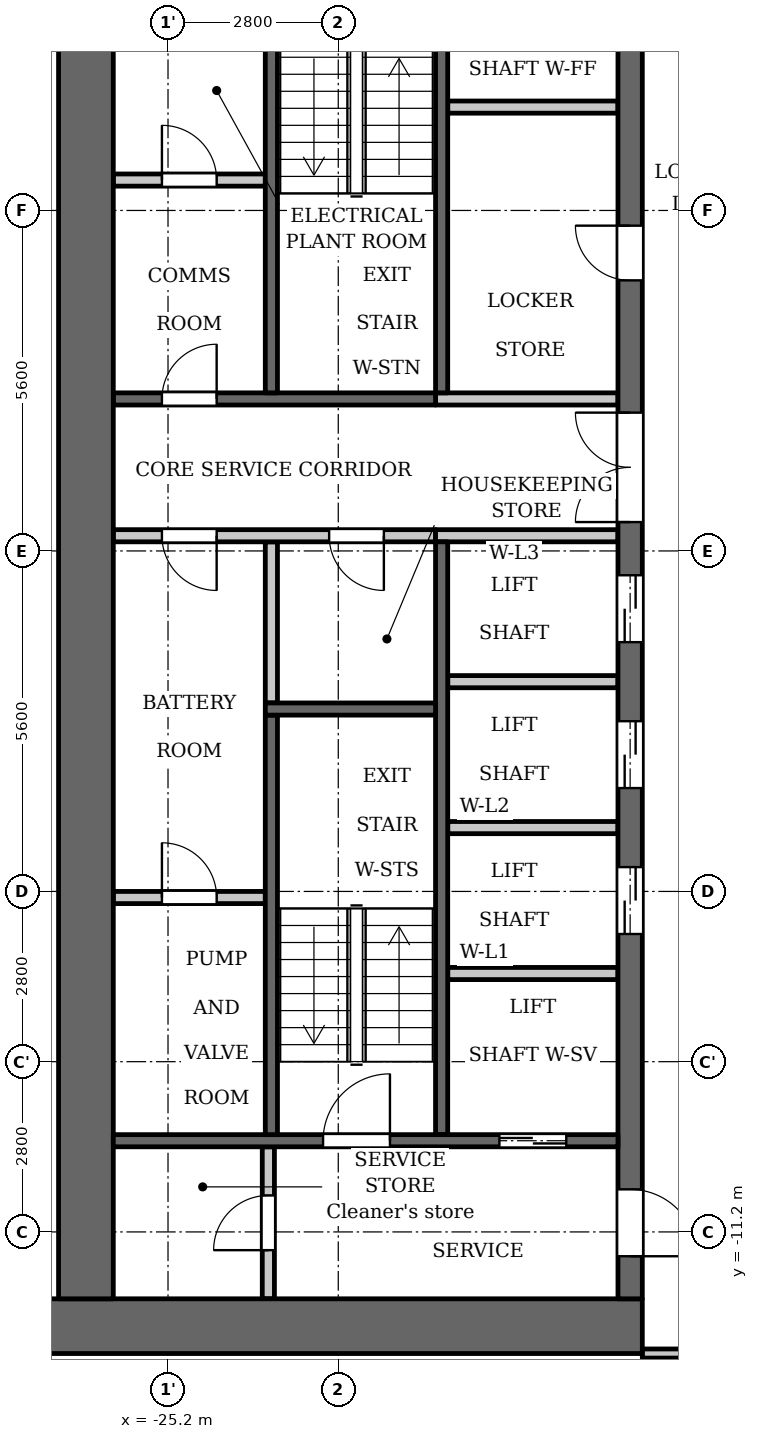
"""IFC4 building model, lengths in metres.
Left out: names, types, materials, properties, quantities, classifications, styles, units other than length and angle.
Written with IfcOpenShell. Run it as: python <this file> out.ifc"""

import sys

from ifc_helpers import new_model, si_unit, direction, frame, frame_2d, origin, place, context, subcontext, project, spatial, rectangle, extrude, element, fill, save


model = new_model("IFC4")
c1 = context("Model", 3, precision=1e-05, world=origin(), true_north=direction((0.0, 1.0)))
c2 = subcontext(c1, "Body", "Model", "MODEL_VIEW")
j1 = project(units=[si_unit("LENGTHUNIT", "METRE"), si_unit("PLANEANGLEUNIT", "RADIAN")], contexts=[c1])
p1 = place(None, origin())
s1 = spatial("IfcSite", under=j1, at=p1, CompositionType="ELEMENT")
p2 = place(p1, origin())
s2 = spatial("IfcBuilding", under=s1, at=p2, CompositionType="ELEMENT")
p3 = place(p2, frame((0.0, 0.0, 100.8)))
s3 = spatial("IfcBuildingStorey", under=s2, at=p3, CompositionType="ELEMENT", Elevation=100.8)
p4 = place(p3, frame((-23.5, -2.5, 0.0), z_axis=(0.0, 0.0, 1.0), x_axis=(0.0, 1.0, 0.0)))
e1 = element("IfcWall", 1, at=p4, inside=s3, PredefinedType="PARTITIONING", context=c2, shape_type="SweptSolid", body=[
    extrude(rectangle(XDim=2.65, YDim=0.2, at=frame_2d((1.325, 0.0))), origin(), (0.0, 0.0, 1.0), 3.2),
])
p5 = place(p3, frame((-20.7, 2.6, 0.0), z_axis=(0.0, 0.0, 1.0), x_axis=(0.0, 1.0, 0.0)))
e2 = element("IfcWall", 2, at=p5, inside=s3, PredefinedType="SHEAR", context=c2, shape_type="SweptSolid", body=[
    extrude(rectangle(XDim=7.0, YDim=0.2, at=frame_2d((3.5, 0.0))), origin(), (0.0, 0.0, 1.0), 3.2),
])
p6 = place(p3, frame((-20.7, -9.6, 0.0), z_axis=(0.0, 0.0, 1.0), x_axis=(0.0, 1.0, 0.0)))
e3 = element("IfcWall", 3, at=p6, inside=s3, PredefinedType="SHEAR", context=c2, shape_type="SweptSolid", body=[
    extrude(rectangle(XDim=9.75, YDim=0.2, at=frame_2d((4.875, 0.0))), origin(), (0.0, 0.0, 1.0), 3.2),
])
p7 = place(p3, frame((-20.8, 2.5, 0.0), z_axis=(0.0, 0.0, 1.0), x_axis=(-1.0, 0.0, 0.0)))
e4 = element("IfcWall", 4, at=p7, inside=s3, PredefinedType="SHEAR", context=c2, shape_type="SweptSolid", body=[
    extrude(rectangle(XDim=5.3, YDim=0.2, at=frame_2d((2.65, 0.0))), origin(), (0.0, 0.0, 1.0), 3.2),
])
p8 = place(p7, frame((3.6, 0.0, 0.0)))
e5 = element("IfcOpeningElement", 5, at=p8, cuts=e4, PredefinedType="OPENING", context=c2, shape_type="SweptSolid", body=[
    extrude(rectangle(XDim=0.9, YDim=2.1, at=frame_2d((0.45, 1.05))), frame((0.0, 0.11, 0.0), z_axis=(0.0, -1.0, 0.0), x_axis=(1.0, 0.0, 0.0)), (0.0, 0.0, 1.0), 0.22),
])
p9 = place(p3, frame((-20.8, 0.25, 0.0), z_axis=(0.0, 0.0, 1.0), x_axis=(-1.0, 0.0, 0.0)))
e6 = element("IfcWall", 6, at=p9, inside=s3, PredefinedType="PARTITIONING", context=c2, shape_type="SweptSolid", body=[
    extrude(rectangle(XDim=5.3, YDim=0.2, at=frame_2d((2.65, 0.0))), origin(), (0.0, 0.0, 1.0), 3.2),
])
p10 = place(p9, frame((0.85, 0.0, 0.0)))
e7 = element("IfcOpeningElement", 7, at=p10, cuts=e6, PredefinedType="OPENING", context=c2, shape_type="SweptSolid", body=[
    extrude(rectangle(XDim=0.9, YDim=2.1, at=frame_2d((0.45, 1.05))), frame((0.0, 0.11, 0.0), z_axis=(0.0, -1.0, 0.0), x_axis=(1.0, 0.0, 0.0)), (0.0, 0.0, 1.0), 0.22),
])
p11 = place(p9, frame((3.6, 0.0, 0.0)))
e8 = element("IfcOpeningElement", 8, at=p11, cuts=e6, PredefinedType="OPENING", context=c2, shape_type="SweptSolid", body=[
    extrude(rectangle(XDim=0.9, YDim=2.1, at=frame_2d((0.45, 1.05))), frame((0.0, 0.11, 0.0), z_axis=(0.0, -1.0, 0.0), x_axis=(1.0, 0.0, 0.0)), (0.0, 0.0, 1.0), 0.22),
])
p12 = place(p3, frame((-17.4, -12.75, 0.0), z_axis=(0.0, 0.0, 1.0), x_axis=(-1.0, 0.0, 0.0)))
e9 = element("IfcWall", 9, at=p12, inside=s3, PredefinedType="SHEAR", context=c2, shape_type="SweptSolid", body=[
    extrude(rectangle(XDim=10.4, YDim=0.9, at=frame_2d((5.2, 0.0))), origin(), (0.0, 0.0, 1.0), 3.2),
])
p13 = place(p3, frame((-17.6, -12.3, 0.0), z_axis=(0.0, 0.0, 1.0), x_axis=(0.0, 1.0, 0.0)))
e10 = element("IfcWall", 10, at=p13, inside=s3, PredefinedType="SHEAR", context=c2, shape_type="SweptSolid", body=[
    extrude(rectangle(XDim=24.6, YDim=0.4, at=frame_2d((12.3, 0.0))), origin(), (0.0, 0.0, 1.0), 3.2),
])
p14 = place(p13, frame((6.0, 0.0, 0.0)))
e11 = element("IfcOpeningElement", 11, at=p14, cuts=e10, PredefinedType="OPENING", context=c2, shape_type="SweptSolid", body=[
    extrude(rectangle(XDim=1.1, YDim=2.1, at=frame_2d((0.55, 1.05))), frame((0.0, 0.21, 0.0), z_axis=(0.0, -1.0, 0.0), x_axis=(1.0, 0.0, 0.0)), (0.0, 0.0, 1.0), 0.42),
])
p15 = place(p13, frame((8.4, 0.0, 0.0)))
e12 = element("IfcOpeningElement", 12, at=p15, cuts=e10, PredefinedType="OPENING", context=c2, shape_type="SweptSolid", body=[
    extrude(rectangle(XDim=1.1, YDim=2.1, at=frame_2d((0.55, 1.05))), frame((0.0, 0.21, 0.0), z_axis=(0.0, -1.0, 0.0), x_axis=(1.0, 0.0, 0.0)), (0.0, 0.0, 1.0), 0.42),
])
p16 = place(p13, frame((10.8, 0.0, 0.0)))
e13 = element("IfcOpeningElement", 13, at=p16, cuts=e10, PredefinedType="OPENING", context=c2, shape_type="SweptSolid", body=[
    extrude(rectangle(XDim=1.1, YDim=2.1, at=frame_2d((0.55, 1.05))), frame((0.0, 0.21, 0.0), z_axis=(0.0, -1.0, 0.0), x_axis=(1.0, 0.0, 0.0)), (0.0, 0.0, 1.0), 0.42),
])
p17 = place(p13, frame((16.75, 0.0, 0.0)))
e14 = element("IfcOpeningElement", 14, at=p17, cuts=e10, PredefinedType="OPENING", context=c2, shape_type="SweptSolid", body=[
    extrude(rectangle(XDim=0.9, YDim=2.1, at=frame_2d((0.45, 1.05))), frame((0.0, 0.21, 0.0), z_axis=(0.0, -1.0, 0.0), x_axis=(1.0, 0.0, 0.0)), (0.0, 0.0, 1.0), 0.42),
])
p18 = place(p13, frame((22.8, 0.0, 0.0)))
e15 = element("IfcOpeningElement", 15, at=p18, cuts=e10, PredefinedType="OPENING", context=c2, shape_type="SweptSolid", body=[
    extrude(rectangle(XDim=1.1, YDim=2.1, at=frame_2d((0.55, 1.05))), frame((0.0, 0.21, 0.0), z_axis=(0.0, -1.0, 0.0), x_axis=(1.0, 0.0, 0.0)), (0.0, 0.0, 1.0), 0.42),
])
p19 = place(p13, frame((0.7, 0.0, 0.0)))
e16 = element("IfcOpeningElement", 16, at=p19, cuts=e10, PredefinedType="OPENING", context=c2, shape_type="SweptSolid", body=[
    extrude(rectangle(XDim=1.1, YDim=2.1, at=frame_2d((0.55, 1.05))), frame((0.0, 0.21, 0.0), z_axis=(0.0, -1.0, 0.0), x_axis=(1.0, 0.0, 0.0)), (0.0, 0.0, 1.0), 0.42),
])
p20 = place(p13, frame((12.775, 0.0, 0.0)))
e17 = element("IfcOpeningElement", 17, at=p20, cuts=e10, PredefinedType="OPENING", context=c2, shape_type="SweptSolid", body=[
    extrude(rectangle(XDim=1.8, YDim=2.1, at=frame_2d((0.9, 1.05))), frame((0.0, 0.21, 0.0), z_axis=(0.0, -1.0, 0.0), x_axis=(1.0, 0.0, 0.0)), (0.0, 0.0, 1.0), 0.42),
])
p21 = place(p3, frame((-26.55, -12.3, 0.0), z_axis=(0.0, 0.0, 1.0), x_axis=(0.0, 1.0, 0.0)))
e18 = element("IfcWall", 18, at=p21, inside=s3, PredefinedType="SHEAR", context=c2, shape_type="SweptSolid", body=[
    extrude(rectangle(XDim=24.6, YDim=0.9, at=frame_2d((12.3, 0.0))), origin(), (0.0, 0.0, 1.0), 3.2),
])
p22 = place(p3, frame((-23.55, -12.3, 0.0), z_axis=(0.0, 0.0, 1.0), x_axis=(0.0, 1.0, 0.0)))
e19 = element("IfcWall", 19, at=p22, inside=s3, PredefinedType="PARTITIONING", context=c2, shape_type="SweptSolid", body=[
    extrude(rectangle(XDim=2.5, YDim=0.2, at=frame_2d((1.25, 0.0))), origin(), (0.0, 0.0, 1.0), 3.2),
])
p23 = place(p22, frame((0.8, 0.0, 0.0)))
e20 = element("IfcOpeningElement", 20, at=p23, cuts=e19, PredefinedType="OPENING", context=c2, shape_type="SweptSolid", body=[
    extrude(rectangle(XDim=0.9, YDim=2.1, at=frame_2d((0.45, 1.05))), frame((0.0, 0.11, 0.0), z_axis=(0.0, -1.0, 0.0), x_axis=(1.0, 0.0, 0.0)), (0.0, 0.0, 1.0), 0.22),
])
p24 = place(p3, frame((-23.6, -5.7, 0.0), z_axis=(0.0, 0.0, 1.0), x_axis=(-1.0, 0.0, 0.0)))
e21 = element("IfcWall", 21, at=p24, inside=s3, PredefinedType="PARTITIONING", context=c2, shape_type="SweptSolid", body=[
    extrude(rectangle(XDim=2.5, YDim=0.2, at=frame_2d((1.25, 0.0))), origin(), (0.0, 0.0, 1.0), 3.2),
])
p25 = place(p24, frame((0.8, 0.0, 0.0)))
e22 = element("IfcOpeningElement", 22, at=p25, cuts=e21, PredefinedType="OPENING", context=c2, shape_type="SweptSolid", body=[
    extrude(rectangle(XDim=0.9, YDim=2.1, at=frame_2d((0.45, 1.05))), frame((0.0, 0.11, 0.0), z_axis=(0.0, -1.0, 0.0), x_axis=(1.0, 0.0, 0.0)), (0.0, 0.0, 1.0), 0.22),
])
p26 = place(p3, frame((-23.6, 6.1, 0.0), z_axis=(0.0, 0.0, 1.0), x_axis=(-1.0, 0.0, 0.0)))
e23 = element("IfcWall", 23, at=p26, inside=s3, PredefinedType="PARTITIONING", context=c2, shape_type="SweptSolid", body=[
    extrude(rectangle(XDim=2.5, YDim=0.2, at=frame_2d((1.25, 0.0))), origin(), (0.0, 0.0, 1.0), 3.2),
])
p27 = place(p26, frame((0.8, 0.0, 0.0)))
e24 = element("IfcOpeningElement", 24, at=p27, cuts=e23, PredefinedType="OPENING", context=c2, shape_type="SweptSolid", body=[
    extrude(rectangle(XDim=0.9, YDim=2.1, at=frame_2d((0.45, 1.05))), frame((0.0, 0.11, 0.0), z_axis=(0.0, -1.0, 0.0), x_axis=(1.0, 0.0, 0.0)), (0.0, 0.0, 1.0), 0.22),
])
p28 = place(p3, frame((-17.8, -9.7, 0.0), z_axis=(0.0, 0.0, 1.0), x_axis=(-1.0, 0.0, 0.0)))
e25 = element("IfcWall", 25, at=p28, inside=s3, PredefinedType="SHEAR", context=c2, shape_type="SweptSolid", body=[
    extrude(rectangle(XDim=8.3, YDim=0.2, at=frame_2d((4.15, 0.0))), origin(), (0.0, 0.0, 1.0), 3.2),
])
p29 = place(p28, frame((0.85, 0.0, 0.0)))
e26 = element("IfcOpeningElement", 26, at=p29, cuts=e25, PredefinedType="OPENING", context=c2, shape_type="SweptSolid", body=[
    extrude(rectangle(XDim=1.1, YDim=2.1, at=frame_2d((0.55, 1.05))), frame((0.0, 0.11, 0.0), z_axis=(0.0, -1.0, 0.0), x_axis=(1.0, 0.0, 0.0)), (0.0, 0.0, 1.0), 0.22),
])
p30 = place(p28, frame((3.75, 0.0, 0.0)))
e27 = element("IfcOpeningElement", 27, at=p30, cuts=e25, PredefinedType="OPENING", context=c2, shape_type="SweptSolid", body=[
    extrude(rectangle(XDim=1.1, YDim=2.1, at=frame_2d((0.55, 1.05))), frame((0.0, 0.11, 0.0), z_axis=(0.0, -1.0, 0.0), x_axis=(1.0, 0.0, 0.0)), (0.0, 0.0, 1.0), 0.22),
])
for number, where, z_axis, x_axis in (
    (28, (-17.8, -6.95, 0.0), (0.0, 0.0, 1.0), (-1.0, 0.0, 0.0)),
    (29, (-17.8, -4.55, 0.0), (0.0, 0.0, 1.0), (-1.0, 0.0, 0.0)),
    (30, (-17.8, -2.15, 0.0), (0.0, 0.0, 1.0), (-1.0, 0.0, 0.0)),
):
    element("IfcWall", number, at=place(p3, frame(where, z_axis=z_axis, x_axis=x_axis)), inside=s3, PredefinedType="PARTITIONING", context=c2, shape_type="SweptSolid", body=[
        extrude(rectangle(XDim=2.8, YDim=0.2, at=frame_2d((1.4, 0.0))), origin(), (0.0, 0.0, 1.0), 3.2),
    ])
for number, where, z_axis, x_axis in (
    (31, (-17.8, 0.25, 0.0), (0.0, 0.0, 1.0), (-1.0, 0.0, 0.0)),
    (32, (-17.8, 2.5, 0.0), (0.0, 0.0, 1.0), (-1.0, 0.0, 0.0)),
):
    element("IfcWall", number, at=place(p3, frame(where, z_axis=z_axis, x_axis=x_axis)), inside=s3, PredefinedType="PARTITIONING", context=c2, shape_type="SweptSolid", body=[
        extrude(rectangle(XDim=3.0, YDim=0.2, at=frame_2d((1.5, 0.0))), origin(), (0.0, 0.0, 1.0), 3.2),
    ])
p31 = place(p3, frame((-17.8, 7.3, 0.0), z_axis=(0.0, 0.0, 1.0), x_axis=(-1.0, 0.0, 0.0)))
e33 = element("IfcWall", 33, at=p31, inside=s3, PredefinedType="PARTITIONING", context=c2, shape_type="SweptSolid", body=[
    extrude(rectangle(XDim=2.8, YDim=0.2, at=frame_2d((1.4, 0.0))), origin(), (0.0, 0.0, 1.0), 3.2),
])
p32 = place(p3, frame((-23.5, 2.6, 0.0), z_axis=(0.0, 0.0, 1.0), x_axis=(0.0, 1.0, 0.0)))
e34 = element("IfcWall", 34, at=p32, inside=s3, PredefinedType="SHEAR", context=c2, shape_type="SweptSolid", body=[
    extrude(rectangle(XDim=7.0, YDim=0.2, at=frame_2d((3.5, 0.0))), origin(), (0.0, 0.0, 1.0), 3.2),
])
p33 = place(p3, frame((-23.5, -9.6, 0.0), z_axis=(0.0, 0.0, 1.0), x_axis=(0.0, 1.0, 0.0)))
e35 = element("IfcWall", 35, at=p33, inside=s3, PredefinedType="SHEAR", context=c2, shape_type="SweptSolid", body=[
    extrude(rectangle(XDim=6.9, YDim=0.2, at=frame_2d((3.45, 0.0))), origin(), (0.0, 0.0, 1.0), 3.2),
])
p34 = place(p3, frame((-20.8, -2.6, 0.0), z_axis=(0.0, 0.0, 1.0), x_axis=(-1.0, 0.0, 0.0)))
e36 = element("IfcWall", 36, at=p34, inside=s3, PredefinedType="SHEAR", context=c2, shape_type="SweptSolid", body=[
    extrude(rectangle(XDim=2.8, YDim=0.2, at=frame_2d((1.4, 0.0))), origin(), (0.0, 0.0, 1.0), 3.2),
])
p35 = place(p3, frame((-17.4, -13.2, 0.0), z_axis=(0.0, 0.0, 1.0), x_axis=(1.0, 0.0, 0.0)))
e37 = element("IfcWall", 37, at=p35, inside=s3, PredefinedType="PARTITIONING", context=c2, shape_type="SweptSolid", body=[
    extrude(rectangle(XDim=34.8, YDim=0.15, at=frame_2d((17.4, 0.0))), origin(), (0.0, 0.0, 1.0), 3.2),
])
p36 = place(p35, frame((0.65, 0.0, 0.0)))
e38 = element("IfcOpeningElement", 38, at=p36, cuts=e37, PredefinedType="OPENING", context=c2, shape_type="SweptSolid", body=[
    extrude(rectangle(XDim=1.0, YDim=2.1, at=frame_2d((0.5, 1.05))), frame((0.0, 0.085, 0.0), z_axis=(0.0, -1.0, 0.0), x_axis=(1.0, 0.0, 0.0)), (0.0, 0.0, 1.0), 0.17),
])
p37 = place(p35, frame((33.05, 0.0, 0.0)))
e39 = element("IfcOpeningElement", 39, at=p37, cuts=e37, PredefinedType="OPENING", context=c2, shape_type="SweptSolid", body=[
    extrude(rectangle(XDim=1.0, YDim=2.1, at=frame_2d((0.5, 1.05))), frame((0.0, 0.085, 0.0), z_axis=(0.0, -1.0, 0.0), x_axis=(1.0, 0.0, 0.0)), (0.0, 0.0, 1.0), 0.17),
])
p38 = place(p35, frame((4.55, 0.0, 0.0)))
e40 = element("IfcOpeningElement", 40, at=p38, cuts=e37, PredefinedType="OPENING", context=c2, shape_type="SweptSolid", body=[
    extrude(rectangle(XDim=1.0, YDim=2.1, at=frame_2d((0.5, 1.05))), frame((0.0, 0.085, 0.0), z_axis=(0.0, -1.0, 0.0), x_axis=(1.0, 0.0, 0.0)), (0.0, 0.0, 1.0), 0.17),
])
p39 = place(p35, frame((21.35, 0.0, 0.0)))
e41 = element("IfcOpeningElement", 41, at=p39, cuts=e37, PredefinedType="OPENING", context=c2, shape_type="SweptSolid", body=[
    extrude(rectangle(XDim=1.0, YDim=2.1, at=frame_2d((0.5, 1.05))), frame((0.0, 0.085, 0.0), z_axis=(0.0, -1.0, 0.0), x_axis=(1.0, 0.0, 0.0)), (0.0, 0.0, 1.0), 0.17),
])
p40 = place(p35, frame((30.75, 0.0, 0.0)))
e42 = element("IfcOpeningElement", 42, at=p40, cuts=e37, PredefinedType="OPENING", context=c2, shape_type="SweptSolid", body=[
    extrude(rectangle(XDim=1.0, YDim=2.1, at=frame_2d((0.5, 1.05))), frame((0.0, 0.085, 0.0), z_axis=(0.0, -1.0, 0.0), x_axis=(1.0, 0.0, 0.0)), (0.0, 0.0, 1.0), 0.17),
])
p41 = place(p29, origin())
e43 = element("IfcDoor", 43, at=p41, inside=s3, OperationType="DOUBLE_DOOR_SLIDING", PredefinedType="DOOR", context=c2, shape_type="SweptSolid", body=[
    extrude(rectangle(XDim=1.1, YDim=2.1, at=frame_2d((0.55, 1.05))), frame((0.0, 0.025, 0.0), z_axis=(0.0, -1.0, 0.0), x_axis=(1.0, 0.0, 0.0)), (0.0, 0.0, 1.0), 0.05),
])
fill(e26, e43)
p42 = place(p14, origin())
e44 = element("IfcDoor", 44, at=p42, inside=s3, OperationType="DOUBLE_DOOR_SLIDING", PredefinedType="DOOR", context=c2, shape_type="SweptSolid", body=[
    extrude(rectangle(XDim=1.1, YDim=2.1, at=frame_2d((0.55, 1.05))), frame((0.0, 0.025, 0.0), z_axis=(0.0, -1.0, 0.0), x_axis=(1.0, 0.0, 0.0)), (0.0, 0.0, 1.0), 0.05),
])
fill(e11, e44)
p43 = place(p15, origin())
e45 = element("IfcDoor", 45, at=p43, inside=s3, OperationType="DOUBLE_DOOR_SLIDING", PredefinedType="DOOR", context=c2, shape_type="SweptSolid", body=[
    extrude(rectangle(XDim=1.1, YDim=2.1, at=frame_2d((0.55, 1.05))), frame((0.0, 0.025, 0.0), z_axis=(0.0, -1.0, 0.0), x_axis=(1.0, 0.0, 0.0)), (0.0, 0.0, 1.0), 0.05),
])
fill(e12, e45)
p44 = place(p16, origin())
e46 = element("IfcDoor", 46, at=p44, inside=s3, OperationType="DOUBLE_DOOR_SLIDING", PredefinedType="DOOR", context=c2, shape_type="SweptSolid", body=[
    extrude(rectangle(XDim=1.1, YDim=2.1, at=frame_2d((0.55, 1.05))), frame((0.0, 0.025, 0.0), z_axis=(0.0, -1.0, 0.0), x_axis=(1.0, 0.0, 0.0)), (0.0, 0.0, 1.0), 0.05),
])
fill(e13, e46)
p45 = place(p17, origin())
e47 = element("IfcDoor", 47, at=p45, inside=s3, OperationType="SINGLE_SWING_LEFT", PredefinedType="DOOR", context=c2, shape_type="SweptSolid", body=[
    extrude(rectangle(XDim=0.9, YDim=2.1, at=frame_2d((0.45, 1.05))), frame((0.0, 0.025, 0.0), z_axis=(0.0, -1.0, 0.0), x_axis=(1.0, 0.0, 0.0)), (0.0, 0.0, 1.0), 0.05),
])
fill(e14, e47)
p46 = place(p19, origin())
e48 = element("IfcDoor", 48, at=p46, inside=s3, OperationType="SINGLE_SWING_LEFT", PredefinedType="DOOR", context=c2, shape_type="SweptSolid", body=[
    extrude(rectangle(XDim=1.1, YDim=2.1, at=frame_2d((0.55, 1.05))), frame((0.0, 0.025, 0.0), z_axis=(0.0, -1.0, 0.0), x_axis=(1.0, 0.0, 0.0)), (0.0, 0.0, 1.0), 0.05),
])
fill(e16, e48)
p47 = place(p23, origin())
e49 = element("IfcDoor", 49, at=p47, inside=s3, OperationType="SINGLE_SWING_RIGHT", PredefinedType="DOOR", context=c2, shape_type="SweptSolid", body=[
    extrude(rectangle(XDim=0.9, YDim=2.1, at=frame_2d((0.45, 1.05))), frame((0.0, 0.025, 0.0), z_axis=(0.0, -1.0, 0.0), x_axis=(1.0, 0.0, 0.0)), (0.0, 0.0, 1.0), 0.05),
])
fill(e20, e49)
p48 = place(p30, origin())
e50 = element("IfcDoor", 50, at=p48, inside=s3, OperationType="SINGLE_SWING_LEFT", PredefinedType="DOOR", context=c2, shape_type="SweptSolid", body=[
    extrude(rectangle(XDim=1.1, YDim=2.1, at=frame_2d((0.55, 1.05))), frame((0.0, 0.025, 0.0), z_axis=(0.0, -1.0, 0.0), x_axis=(1.0, 0.0, 0.0)), (0.0, 0.0, 1.0), 0.05),
])
fill(e27, e50)
p49 = place(p20, origin())
e51 = element("IfcDoor", 51, at=p49, inside=s3, OperationType="DOUBLE_DOOR_SINGLE_SWING", PredefinedType="DOOR", context=c2, shape_type="SweptSolid", body=[
    extrude(rectangle(XDim=1.8, YDim=2.1, at=frame_2d((0.9, 1.05))), frame((0.0, 0.025, 0.0), z_axis=(0.0, -1.0, 0.0), x_axis=(1.0, 0.0, 0.0)), (0.0, 0.0, 1.0), 0.05),
])
fill(e17, e51)
p50 = place(p10, origin())
e52 = element("IfcDoor", 52, at=p50, inside=s3, OperationType="SINGLE_SWING_RIGHT", PredefinedType="DOOR", context=c2, shape_type="SweptSolid", body=[
    extrude(rectangle(XDim=0.9, YDim=2.1, at=frame_2d((0.45, 1.05))), frame((0.0, 0.025, 0.0), z_axis=(0.0, -1.0, 0.0), x_axis=(1.0, 0.0, 0.0)), (0.0, 0.0, 1.0), 0.05),
])
fill(e7, e52)
p51 = place(p25, origin())
e53 = element("IfcDoor", 53, at=p51, inside=s3, OperationType="SINGLE_SWING_RIGHT", PredefinedType="DOOR", context=c2, shape_type="SweptSolid", body=[
    extrude(rectangle(XDim=0.9, YDim=2.1, at=frame_2d((0.45, 1.05))), frame((0.0, 0.025, 0.0), z_axis=(0.0, -1.0, 0.0), x_axis=(1.0, 0.0, 0.0)), (0.0, 0.0, 1.0), 0.05),
])
fill(e22, e53)
p52 = place(p11, origin())
e54 = element("IfcDoor", 54, at=p52, inside=s3, OperationType="SINGLE_SWING_RIGHT", PredefinedType="DOOR", context=c2, shape_type="SweptSolid", body=[
    extrude(rectangle(XDim=0.9, YDim=2.1, at=frame_2d((0.45, 1.05))), frame((0.0, 0.025, 0.0), z_axis=(0.0, -1.0, 0.0), x_axis=(1.0, 0.0, 0.0)), (0.0, 0.0, 1.0), 0.05),
])
fill(e8, e54)
p53 = place(p27, origin())
e55 = element("IfcDoor", 55, at=p53, inside=s3, OperationType="SINGLE_SWING_RIGHT", PredefinedType="DOOR", context=c2, shape_type="SweptSolid", body=[
    extrude(rectangle(XDim=0.9, YDim=2.1, at=frame_2d((0.45, 1.05))), frame((0.0, 0.025, 0.0), z_axis=(0.0, -1.0, 0.0), x_axis=(1.0, 0.0, 0.0)), (0.0, 0.0, 1.0), 0.05),
])
fill(e24, e55)
p54 = place(p8, origin())
e56 = element("IfcDoor", 56, at=p54, inside=s3, OperationType="SINGLE_SWING_LEFT", PredefinedType="DOOR", context=c2, shape_type="SweptSolid", body=[
    extrude(rectangle(XDim=0.9, YDim=2.1, at=frame_2d((0.45, 1.05))), frame((0.0, 0.025, 0.0), z_axis=(0.0, -1.0, 0.0), x_axis=(1.0, 0.0, 0.0)), (0.0, 0.0, 1.0), 0.05),
])
fill(e5, e56)
save(model, sys.argv[1])
